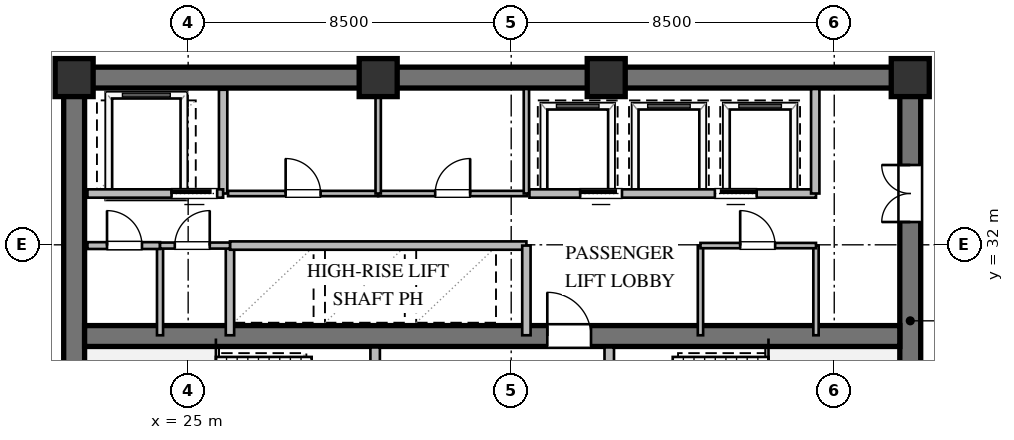
"""IFC4 building model, lengths in metres.
Left out: names, types, materials, properties, quantities, classifications, styles, units other than length and angle.
Written with IfcOpenShell. Run it as: python <this file> out.ifc"""

import sys

from ifc_helpers import new_model, si_unit, direction, frame, frame_2d, origin, origin_2d, place, context, subcontext, project, spatial, rectangle, extrude, element, fill, save


model = new_model("IFC4")
c1 = context("Model", 3, precision=1e-05, world=origin(), true_north=direction((0.0, 1.0)))
c2 = subcontext(c1, "Body", "Model", "MODEL_VIEW")
j1 = project(units=[si_unit("LENGTHUNIT", "METRE"), si_unit("PLANEANGLEUNIT", "RADIAN")], contexts=[c1])
p1 = place(None, origin())
s1 = spatial("IfcSite", under=j1, at=p1, CompositionType="ELEMENT")
p2 = place(p1, origin())
s2 = spatial("IfcBuilding", under=s1, at=p2, CompositionType="ELEMENT")
p3 = place(p2, frame((0.0, 0.0, 124.2)))
s3 = spatial("IfcBuildingStorey", under=s2, at=p3, CompositionType="ELEMENT", Elevation=124.2)
p4 = place(p3, frame((21.725, 36.4, 0.0), z_axis=(0.0, 0.0, 1.0), x_axis=(1.0, 0.0, 0.0)))
e1 = element("IfcWall", 1, at=p4, inside=s3, PredefinedType="SHEAR", context=c2, shape_type="SweptSolid", body=[
    extrude(rectangle(XDim=22.55, YDim=0.55, at=frame_2d((11.275, 0.0))), origin(), (0.0, 0.0, 1.0), 3.36),
])
p5 = place(p3, frame((22.0, 23.875, 0.0), z_axis=(0.0, 0.0, 1.0), x_axis=(0.0, 1.0, 0.0)))
e2 = element("IfcWall", 2, at=p5, inside=s3, PredefinedType="SHEAR", context=c2, shape_type="SweptSolid", body=[
    extrude(rectangle(XDim=12.25, YDim=0.55, at=frame_2d((6.125, 0.0))), origin(), (0.0, 0.0, 1.0), 3.36),
])
p6 = place(p3, frame((44.0, 23.875, 0.0), z_axis=(0.0, 0.0, 1.0), x_axis=(0.0, 1.0, 0.0)))
e3 = element("IfcWall", 3, at=p6, inside=s3, PredefinedType="SHEAR", context=c2, shape_type="SweptSolid", body=[
    extrude(rectangle(XDim=12.25, YDim=0.55, at=frame_2d((6.125, 0.0))), origin(), (0.0, 0.0, 1.0), 3.36),
])
p7 = place(p6, frame((8.725, 0.0, 0.0)))
e4 = element("IfcOpeningElement", 4, at=p7, cuts=e3, PredefinedType="OPENING", context=c2, shape_type="SweptSolid", body=[
    extrude(rectangle(XDim=1.5, YDim=2.15, at=frame_2d((0.75, 1.075))), frame((0.0, 0.285, 0.0), z_axis=(0.0, -1.0, 0.0), x_axis=(1.0, 0.0, 0.0)), (0.0, 0.0, 1.0), 0.57),
])
p8 = place(p3, frame((22.275, 29.6, 0.0), z_axis=(0.0, 0.0, 1.0), x_axis=(1.0, 0.0, 0.0)))
e5 = element("IfcWall", 5, at=p8, inside=s3, PredefinedType="SHEAR", context=c2, shape_type="SweptSolid", body=[
    extrude(rectangle(XDim=21.45, YDim=0.55, at=frame_2d((10.725, 0.0))), origin(), (0.0, 0.0, 1.0), 3.36),
])
p9 = place(p8, frame((12.175, 0.0, 0.0)))
e6 = element("IfcOpeningElement", 6, at=p9, cuts=e5, PredefinedType="OPENING", context=c2, shape_type="SweptSolid", body=[
    extrude(rectangle(XDim=1.15, YDim=2.1, at=frame_2d((0.575, 1.05))), frame((0.0, 0.285, 0.0), z_axis=(0.0, -1.0, 0.0), x_axis=(1.0, 0.0, 0.0)), (0.0, 0.0, 1.0), 0.57),
])
for number, where, z_axis, x_axis in (
    (7, (44.0, 36.4, 0.0), (0.0, 0.0, 1.0), (1.0, 0.0, 0.0)),
    (8, (36.0, 36.4, 0.0), (0.0, 0.0, 1.0), (1.0, 0.0, 0.0)),
    (9, (30.0, 36.4, 0.0), (0.0, 0.0, 1.0), (1.0, 0.0, 0.0)),
    (10, (22.0, 36.4, 0.0), (0.0, 0.0, 1.0), (1.0, 0.0, 0.0)),
):
    element("IfcColumn", number, at=place(p3, frame(where, z_axis=z_axis, x_axis=x_axis)), inside=s3, PredefinedType="COLUMN", context=c2, shape_type="SweptSolid", body=[
        extrude(rectangle(XDim=1.0, YDim=1.0, at=origin_2d()), origin(), (0.0, 0.0, 1.0), 3.6),
    ])
p10 = place(p3, frame((29.92, 23.9, 0.0), z_axis=(0.0, 0.0, 1.0), x_axis=(0.0, 1.0, 0.0)))
e11 = element("IfcWall", 11, at=p10, inside=s3, PredefinedType="SOLIDWALL", context=c2, shape_type="SweptSolid", body=[
    extrude(rectangle(XDim=5.4, YDim=0.25, at=frame_2d((2.7, 0.0))), origin(), (0.0, 0.0, 1.0), 2.806),
])
p11 = place(p10, frame((3.421, 0.0, 0.0)))
e12 = element("IfcOpeningElement", 12, at=p11, cuts=e11, PredefinedType="OPENING", context=c2, shape_type="SweptSolid", body=[
    extrude(rectangle(XDim=1.15, YDim=2.1, at=frame_2d((0.575, 1.05))), frame((0.0, 0.135, 0.0), z_axis=(0.0, -1.0, 0.0), x_axis=(1.0, 0.0, 0.0)), (0.0, 0.0, 1.0), 0.27),
])
p12 = place(p3, frame((36.08, 23.9, 0.0), z_axis=(0.0, 0.0, 1.0), x_axis=(0.0, 1.0, 0.0)))
e13 = element("IfcWall", 13, at=p12, inside=s3, PredefinedType="SOLIDWALL", context=c2, shape_type="SweptSolid", body=[
    extrude(rectangle(XDim=5.4, YDim=0.25, at=frame_2d((2.7, 0.0))), origin(), (0.0, 0.0, 1.0), 3.36),
])
p13 = place(p12, frame((3.421, 0.0, 0.0)))
e14 = element("IfcOpeningElement", 14, at=p13, cuts=e13, PredefinedType="OPENING", context=c2, shape_type="SweptSolid", body=[
    extrude(rectangle(XDim=1.15, YDim=2.1, at=frame_2d((0.575, 1.05))), frame((0.0, 0.135, 0.0), z_axis=(0.0, -1.0, 0.0), x_axis=(1.0, 0.0, 0.0)), (0.0, 0.0, 1.0), 0.27),
])
p14 = place(p3, frame((25.92, 33.35, 0.0), z_axis=(0.0, 0.0, 1.0), x_axis=(0.0, 1.0, 0.0)))
e15 = element("IfcWall", 15, at=p14, inside=s3, PredefinedType="SOLIDWALL", context=c2, shape_type="SweptSolid", body=[
    extrude(rectangle(XDim=2.73, YDim=0.22, at=frame_2d((1.365, 0.0))), origin(), (0.0, 0.0, 1.0), 3.36),
])
p15 = place(p3, frame((22.35, 33.35, 0.0), z_axis=(0.0, 0.0, 1.0), x_axis=(1.0, 0.0, 0.0)))
e16 = element("IfcWall", 16, at=p15, inside=s3, PredefinedType="SOLIDWALL", context=c2, shape_type="SweptSolid", body=[
    extrude(rectangle(XDim=3.57, YDim=0.22, at=frame_2d((1.785, 0.0))), origin(), (0.0, 0.0, 1.0), 3.36),
])
p16 = place(p15, frame((2.213, 0.0, 0.0)))
e17 = element("IfcOpeningElement", 17, at=p16, cuts=e16, PredefinedType="OPENING", context=c2, shape_type="SweptSolid", body=[
    extrude(rectangle(XDim=1.2, YDim=2.1, at=frame_2d((0.6, 1.05))), frame((0.0, 0.12, 0.0), z_axis=(0.0, -1.0, 0.0), x_axis=(1.0, 0.0, 0.0)), (0.0, 0.0, 1.0), 0.24),
])
p17 = place(p3, frame((26.1, 29.62, 0.0), z_axis=(0.0, 0.0, 1.0), x_axis=(0.0, 1.0, 0.0)))
e18 = element("IfcWall", 18, at=p17, inside=s3, PredefinedType="SOLIDWALL", context=c2, shape_type="SweptSolid", body=[
    extrude(rectangle(XDim=2.36, YDim=0.22, at=frame_2d((1.18, 0.0))), origin(), (0.0, 0.0, 1.0), 3.36),
])
p18 = place(p3, frame((26.1, 31.98, 0.0), z_axis=(0.0, 0.0, 1.0), x_axis=(1.0, 0.0, 0.0)))
e19 = element("IfcWall", 19, at=p18, inside=s3, PredefinedType="SOLIDWALL", context=c2, shape_type="SweptSolid", body=[
    extrude(rectangle(XDim=7.8, YDim=0.22, at=frame_2d((3.9, 0.0))), origin(), (0.0, 0.0, 1.0), 3.36),
])
p19 = place(p3, frame((33.9, 29.62, 0.0), z_axis=(0.0, 0.0, 1.0), x_axis=(0.0, 1.0, 0.0)))
e20 = element("IfcWall", 20, at=p19, inside=s3, PredefinedType="SOLIDWALL", context=c2, shape_type="SweptSolid", body=[
    extrude(rectangle(XDim=2.36, YDim=0.22, at=frame_2d((1.18, 0.0))), origin(), (0.0, 0.0, 1.0), 3.36),
])
p20 = place(p3, frame((26.05, 33.35, 0.0), z_axis=(0.0, 0.0, 1.0), x_axis=(1.0, 0.0, 0.0)))
e21 = element("IfcWall", 21, at=p20, inside=s3, PredefinedType="PARTITIONING", context=c2, shape_type="SweptSolid", body=[
    extrude(rectangle(XDim=3.95, YDim=0.14, at=frame_2d((1.975, 0.0))), origin(), (0.0, 0.0, 1.0), 3.36),
])
p21 = place(p20, frame((1.515, 0.0, 0.0)))
e22 = element("IfcOpeningElement", 22, at=p21, cuts=e21, PredefinedType="OPENING", context=c2, shape_type="SweptSolid", body=[
    extrude(rectangle(XDim=0.92, YDim=2.1, at=frame_2d((0.46, 1.05))), frame((0.0, 0.08, 0.0), z_axis=(0.0, -1.0, 0.0), x_axis=(1.0, 0.0, 0.0)), (0.0, 0.0, 1.0), 0.16),
])
p22 = place(p3, frame((30.0, 33.35, 0.0), z_axis=(0.0, 0.0, 1.0), x_axis=(1.0, 0.0, 0.0)))
e23 = element("IfcWall", 23, at=p22, inside=s3, PredefinedType="PARTITIONING", context=c2, shape_type="SweptSolid", body=[
    extrude(rectangle(XDim=3.92, YDim=0.14, at=frame_2d((1.96, 0.0))), origin(), (0.0, 0.0, 1.0), 3.36),
])
p23 = place(p22, frame((1.5, 0.0, 0.0)))
e24 = element("IfcOpeningElement", 24, at=p23, cuts=e23, PredefinedType="OPENING", context=c2, shape_type="SweptSolid", body=[
    extrude(rectangle(XDim=0.92, YDim=2.1, at=frame_2d((0.46, 1.05))), frame((0.0, 0.08, 0.0), z_axis=(0.0, -1.0, 0.0), x_axis=(1.0, 0.0, 0.0)), (0.0, 0.0, 1.0), 0.16),
])
for number, where, z_axis, x_axis in (
    (25, (30.0, 33.35, 0.0), (0.0, 0.0, 1.0), (0.0, 1.0, 0.0)),
    (26, (33.9, 33.35, 0.0), (0.0, 0.0, 1.0), (0.0, 1.0, 0.0)),
):
    element("IfcWall", number, at=place(p3, frame(where, z_axis=z_axis, x_axis=x_axis)), inside=s3, PredefinedType="PARTITIONING", context=c2, shape_type="SweptSolid", body=[
        extrude(rectangle(XDim=2.75, YDim=0.14, at=frame_2d((1.375, 0.0))), origin(), (0.0, 0.0, 1.0), 3.36),
    ])
p24 = place(p3, frame((33.98, 33.35, 0.0), z_axis=(0.0, 0.0, 1.0), x_axis=(1.0, 0.0, 0.0)))
e27 = element("IfcWall", 27, at=p24, inside=s3, PredefinedType="SOLIDWALL", context=c2, shape_type="SweptSolid", body=[
    extrude(rectangle(XDim=7.54, YDim=0.22, at=frame_2d((3.77, 0.0))), origin(), (0.0, 0.0, 1.0), 3.36),
])
p25 = place(p24, frame((1.335, 0.0, 0.0)))
e28 = element("IfcOpeningElement", 28, at=p25, cuts=e27, PredefinedType="OPENING", context=c2, shape_type="SweptSolid", body=[
    extrude(rectangle(XDim=1.1, YDim=2.1, at=frame_2d((0.55, 1.05))), frame((0.0, 0.12, 0.0), z_axis=(0.0, -1.0, 0.0), x_axis=(1.0, 0.0, 0.0)), (0.0, 0.0, 1.0), 0.24),
])
p26 = place(p24, frame((4.879, 0.0, 0.0)))
e29 = element("IfcOpeningElement", 29, at=p26, cuts=e27, PredefinedType="OPENING", context=c2, shape_type="SweptSolid", body=[
    extrude(rectangle(XDim=1.1, YDim=2.1, at=frame_2d((0.55, 1.05))), frame((0.0, 0.12, 0.0), z_axis=(0.0, -1.0, 0.0), x_axis=(1.0, 0.0, 0.0)), (0.0, 0.0, 1.0), 0.24),
])
p27 = place(p3, frame((41.5, 33.35, 0.0), z_axis=(0.0, 0.0, 1.0), x_axis=(0.0, 1.0, 0.0)))
e30 = element("IfcWall", 30, at=p27, inside=s3, PredefinedType="SOLIDWALL", context=c2, shape_type="SweptSolid", body=[
    extrude(rectangle(XDim=2.75, YDim=0.22, at=frame_2d((1.375, 0.0))), origin(), (0.0, 0.0, 1.0), 3.36),
])
p28 = place(p3, frame((24.26, 29.62, 0.0), z_axis=(0.0, 0.0, 1.0), x_axis=(0.0, 1.0, 0.0)))
e31 = element("IfcWall", 31, at=p28, inside=s3, PredefinedType="PLUMBINGWALL", context=c2, shape_type="SweptSolid", body=[
    extrude(rectangle(XDim=2.36, YDim=0.16, at=frame_2d((1.18, 0.0))), origin(), (0.0, 0.0, 1.0), 3.36),
])
p29 = place(p3, frame((22.35, 31.98, 0.0), z_axis=(0.0, 0.0, 1.0), x_axis=(1.0, 0.0, 0.0)))
e32 = element("IfcWall", 32, at=p29, inside=s3, PredefinedType="PARTITIONING", context=c2, shape_type="SweptSolid", body=[
    extrude(rectangle(XDim=1.91, YDim=0.18, at=frame_2d((0.955, 0.0))), origin(), (0.0, 0.0, 1.0), 3.36),
])
p30 = place(p29, frame((0.515, 0.0, 0.0)))
e33 = element("IfcOpeningElement", 33, at=p30, cuts=e32, PredefinedType="OPENING", context=c2, shape_type="SweptSolid", body=[
    extrude(rectangle(XDim=0.92, YDim=2.1, at=frame_2d((0.46, 1.05))), frame((0.0, 0.1, 0.0), z_axis=(0.0, -1.0, 0.0), x_axis=(1.0, 0.0, 0.0)), (0.0, 0.0, 1.0), 0.2),
])
p31 = place(p3, frame((24.26, 31.98, 0.0), z_axis=(0.0, 0.0, 1.0), x_axis=(1.0, 0.0, 0.0)))
e34 = element("IfcWall", 34, at=p31, inside=s3, PredefinedType="PLUMBINGWALL", context=c2, shape_type="SweptSolid", body=[
    extrude(rectangle(XDim=1.84, YDim=0.16, at=frame_2d((0.92, 0.0))), origin(), (0.0, 0.0, 1.0), 3.36),
])
p32 = place(p31, frame((0.388, 0.0, 0.0)))
e35 = element("IfcOpeningElement", 35, at=p32, cuts=e34, PredefinedType="OPENING", context=c2, shape_type="SweptSolid", body=[
    extrude(rectangle(XDim=0.92, YDim=2.1, at=frame_2d((0.46, 1.05))), frame((0.0, 0.09, 0.0), z_axis=(0.0, -1.0, 0.0), x_axis=(1.0, 0.0, 0.0)), (0.0, 0.0, 1.0), 0.18),
])
for number, where, z_axis, x_axis in (
    (36, (38.48, 29.62, 0.0), (0.0, 0.0, 1.0), (0.0, 1.0, 0.0)),
    (37, (41.52, 29.62, 0.0), (0.0, 0.0, 1.0), (0.0, 1.0, 0.0)),
):
    element("IfcWall", number, at=place(p3, frame(where, z_axis=z_axis, x_axis=x_axis)), inside=s3, PredefinedType="PARTITIONING", context=c2, shape_type="SweptSolid", body=[
        extrude(rectangle(XDim=2.36, YDim=0.14, at=frame_2d((1.18, 0.0))), origin(), (0.0, 0.0, 1.0), 3.36),
    ])
p33 = place(p3, frame((38.48, 31.98, 0.0), z_axis=(0.0, 0.0, 1.0), x_axis=(1.0, 0.0, 0.0)))
e38 = element("IfcWall", 38, at=p33, inside=s3, PredefinedType="PARTITIONING", context=c2, shape_type="SweptSolid", body=[
    extrude(rectangle(XDim=3.04, YDim=0.14, at=frame_2d((1.52, 0.0))), origin(), (0.0, 0.0, 1.0), 3.36),
])
p34 = place(p33, frame((1.045, 0.0, 0.0)))
e39 = element("IfcOpeningElement", 39, at=p34, cuts=e38, PredefinedType="OPENING", context=c2, shape_type="SweptSolid", body=[
    extrude(rectangle(XDim=0.92, YDim=2.1, at=frame_2d((0.46, 1.05))), frame((0.0, 0.08, 0.0), z_axis=(0.0, -1.0, 0.0), x_axis=(1.0, 0.0, 0.0)), (0.0, 0.0, 1.0), 0.16),
])
p35 = place(p9, origin())
e40 = element("IfcDoor", 40, at=p35, inside=s3, OperationType="SINGLE_SWING_LEFT", PredefinedType="DOOR", context=c2, shape_type="SweptSolid", body=[
    extrude(rectangle(XDim=1.15, YDim=2.1, at=frame_2d((0.575, 1.05))), frame((0.0, 0.025, 0.0), z_axis=(0.0, -1.0, 0.0), x_axis=(1.0, 0.0, 0.0)), (0.0, 0.0, 1.0), 0.05),
])
fill(e6, e40)
p36 = place(p7, origin())
e41 = element("IfcDoor", 41, at=p36, inside=s3, OperationType="DOUBLE_DOOR_SINGLE_SWING", PredefinedType="DOOR", context=c2, shape_type="SweptSolid", body=[
    extrude(rectangle(XDim=1.5, YDim=2.15, at=frame_2d((0.75, 1.075))), frame((0.0, 0.025, 0.0), z_axis=(0.0, -1.0, 0.0), x_axis=(1.0, 0.0, 0.0)), (0.0, 0.0, 1.0), 0.05),
])
fill(e4, e41)
p37 = place(p16, origin())
e42 = element("IfcDoor", 42, at=p37, inside=s3, OperationType="SLIDING_TO_LEFT", PredefinedType="DOOR", context=c2, shape_type="SweptSolid", body=[
    extrude(rectangle(XDim=1.2, YDim=2.1, at=frame_2d((0.6, 1.05))), frame((0.0, 0.025, 0.0), z_axis=(0.0, -1.0, 0.0), x_axis=(1.0, 0.0, 0.0)), (0.0, 0.0, 1.0), 0.05),
])
fill(e17, e42)
p38 = place(p21, origin())
e43 = element("IfcDoor", 43, at=p38, inside=s3, OperationType="SINGLE_SWING_LEFT", PredefinedType="DOOR", context=c2, shape_type="SweptSolid", body=[
    extrude(rectangle(XDim=0.92, YDim=2.1, at=frame_2d((0.46, 1.05))), frame((0.0, 0.025, 0.0), z_axis=(0.0, -1.0, 0.0), x_axis=(1.0, 0.0, 0.0)), (0.0, 0.0, 1.0), 0.05),
])
fill(e22, e43)
p39 = place(p23, origin())
e44 = element("IfcDoor", 44, at=p39, inside=s3, OperationType="SINGLE_SWING_RIGHT", PredefinedType="DOOR", context=c2, shape_type="SweptSolid", body=[
    extrude(rectangle(XDim=0.92, YDim=2.1, at=frame_2d((0.46, 1.05))), frame((0.0, 0.025, 0.0), z_axis=(0.0, -1.0, 0.0), x_axis=(1.0, 0.0, 0.0)), (0.0, 0.0, 1.0), 0.05),
])
fill(e24, e44)
p40 = place(p25, origin())
e45 = element("IfcDoor", 45, at=p40, inside=s3, OperationType="SLIDING_TO_LEFT", PredefinedType="DOOR", context=c2, shape_type="SweptSolid", body=[
    extrude(rectangle(XDim=1.1, YDim=2.1, at=frame_2d((0.55, 1.05))), frame((0.0, 0.025, 0.0), z_axis=(0.0, -1.0, 0.0), x_axis=(1.0, 0.0, 0.0)), (0.0, 0.0, 1.0), 0.05),
])
fill(e28, e45)
p41 = place(p26, origin())
e46 = element("IfcDoor", 46, at=p41, inside=s3, OperationType="SLIDING_TO_RIGHT", PredefinedType="DOOR", context=c2, shape_type="SweptSolid", body=[
    extrude(rectangle(XDim=1.1, YDim=2.1, at=frame_2d((0.55, 1.05))), frame((0.0, 0.025, 0.0), z_axis=(0.0, -1.0, 0.0), x_axis=(1.0, 0.0, 0.0)), (0.0, 0.0, 1.0), 0.05),
])
fill(e29, e46)
p42 = place(p30, origin())
e47 = element("IfcDoor", 47, at=p42, inside=s3, OperationType="SINGLE_SWING_LEFT", PredefinedType="DOOR", context=c2, shape_type="SweptSolid", body=[
    extrude(rectangle(XDim=0.92, YDim=2.1, at=frame_2d((0.46, 1.05))), frame((0.0, 0.025, 0.0), z_axis=(0.0, -1.0, 0.0), x_axis=(1.0, 0.0, 0.0)), (0.0, 0.0, 1.0), 0.05),
])
fill(e33, e47)
p43 = place(p32, origin())
e48 = element("IfcDoor", 48, at=p43, inside=s3, OperationType="SINGLE_SWING_RIGHT", PredefinedType="DOOR", context=c2, shape_type="SweptSolid", body=[
    extrude(rectangle(XDim=0.92, YDim=2.1, at=frame_2d((0.46, 1.05))), frame((0.0, 0.025, 0.0), z_axis=(0.0, -1.0, 0.0), x_axis=(1.0, 0.0, 0.0)), (0.0, 0.0, 1.0), 0.05),
])
fill(e35, e48)
p44 = place(p34, origin())
e49 = element("IfcDoor", 49, at=p44, inside=s3, OperationType="SINGLE_SWING_LEFT", PredefinedType="DOOR", context=c2, shape_type="SweptSolid", body=[
    extrude(rectangle(XDim=0.92, YDim=2.1, at=frame_2d((0.46, 1.05))), frame((0.0, 0.025, 0.0), z_axis=(0.0, -1.0, 0.0), x_axis=(1.0, 0.0, 0.0)), (0.0, 0.0, 1.0), 0.05),
])
fill(e39, e49)
save(model, sys.argv[1])
